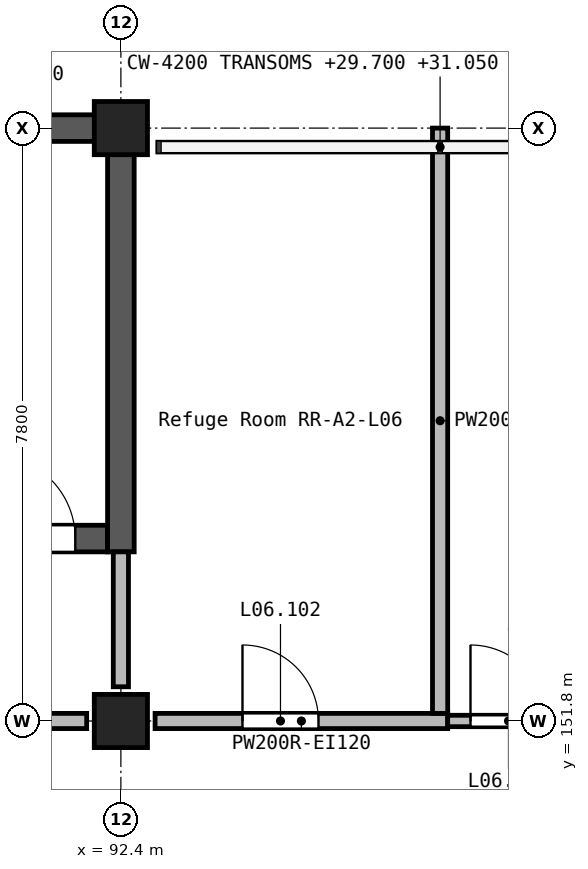
"""IFC4 building model, lengths in metres.
Left out: names, types, materials, properties, quantities, classifications, styles, units other than length and angle.
Written with IfcOpenShell. Run it as: python <this file> out.ifc"""

import sys

from ifc_helpers import new_model, si_unit, direction, frame, frame_2d, origin, origin_2d, place, context, subcontext, project, spatial, rectangle, extrude, element, fill, save


model = new_model("IFC4")
c1 = context("Model", 3, precision=1e-05, world=origin(), true_north=direction((0.0, 1.0)))
c2 = subcontext(c1, "Body", "Model", "MODEL_VIEW")
j1 = project(units=[si_unit("LENGTHUNIT", "METRE"), si_unit("PLANEANGLEUNIT", "RADIAN")], contexts=[c1])
p1 = place(None, origin())
s1 = spatial("IfcSite", under=j1, at=p1, CompositionType="ELEMENT")
p2 = place(p1, origin())
s2 = spatial("IfcBuilding", under=s1, at=p2, CompositionType="ELEMENT")
p3 = place(p2, frame((0.0, 0.0, 28.8)))
s3 = spatial("IfcBuildingStorey", under=s2, at=p3, CompositionType="ELEMENT", Elevation=28.8)
for number, where, z_axis, x_axis in (
    (1, (92.4, 151.8, 0.0), (0.0, 0.0, 1.0), (1.0, 0.0, 0.0)),
    (2, (92.4, 159.6, 0.0), (0.0, 0.0, 1.0), (1.0, 0.0, 0.0)),
):
    element("IfcColumn", number, at=place(p3, frame(where, z_axis=z_axis, x_axis=x_axis)), inside=s3, PredefinedType="COLUMN", context=c2, shape_type="SweptSolid", body=[
        extrude(rectangle(XDim=0.7, YDim=0.7, at=origin_2d()), origin(), (0.0, 0.0, 1.0), 3.9),
    ])
p4 = place(p3, frame((83.825, 159.6, 0.0), z_axis=(0.0, 0.0, 1.0), x_axis=(1.0, 0.0, 0.0)))
e3 = element("IfcWall", 3, at=p4, inside=s3, PredefinedType="SHEAR", context=c2, shape_type="SweptSolid", body=[
    extrude(rectangle(XDim=8.4, YDim=0.35, at=frame_2d((4.2, 0.0))), origin(), (0.0, 0.0, 1.0), 3.9),
])
p5 = place(p3, frame((84.175, 154.2, 0.0), z_axis=(0.0, 0.0, 1.0), x_axis=(1.0, 0.0, 0.0)))
e4 = element("IfcWall", 4, at=p5, inside=s3, PredefinedType="SHEAR", context=c2, shape_type="SweptSolid", body=[
    extrude(rectangle(XDim=8.05, YDim=0.35, at=frame_2d((4.025, 0.0))), origin(), (0.0, 0.0, 1.0), 3.9),
])
p6 = place(p5, frame((6.525, 0.0, 0.0)))
e5 = element("IfcOpeningElement", 5, at=p6, cuts=e4, PredefinedType="OPENING", context=c2, shape_type="SweptSolid", body=[
    extrude(rectangle(XDim=1.1, YDim=2.1, at=frame_2d((0.55, 1.05))), frame((0.0, 0.185, 0.0), z_axis=(0.0, -1.0, 0.0), x_axis=(1.0, 0.0, 0.0)), (0.0, 0.0, 1.0), 0.37),
])
p7 = place(p3, frame((92.4, 154.025, 0.0), z_axis=(0.0, 0.0, 1.0), x_axis=(0.0, 1.0, 0.0)))
e6 = element("IfcWall", 6, at=p7, inside=s3, PredefinedType="SHEAR", context=c2, shape_type="SweptSolid", body=[
    extrude(rectangle(XDim=5.75, YDim=0.35, at=frame_2d((2.875, 0.0))), origin(), (0.0, 0.0, 1.0), 3.9),
])
p8 = place(p3, frame((84.45, 151.8, 0.0), z_axis=(0.0, 0.0, 1.0), x_axis=(1.0, 0.0, 0.0)))
e7 = element("IfcWall", 7, at=p8, inside=s3, PredefinedType="SOLIDWALL", context=c2, shape_type="SweptSolid", body=[
    extrude(rectangle(XDim=7.5, YDim=0.2, at=frame_2d((3.75, 0.0))), origin(), (0.0, 0.0, 1.0), 3.6),
])
p9 = place(p8, frame((3.2, 0.0, 0.0)))
e8 = element("IfcOpeningElement", 8, at=p9, cuts=e7, PredefinedType="OPENING", context=c2, shape_type="SweptSolid", body=[
    extrude(rectangle(XDim=1.1, YDim=2.1, at=frame_2d((0.55, 1.05))), frame((0.0, 0.11, 0.0), z_axis=(0.0, -1.0, 0.0), x_axis=(1.0, 0.0, 0.0)), (0.0, 0.0, 1.0), 0.22),
])
p10 = place(p3, frame((92.85, 151.8, 0.0), z_axis=(0.0, 0.0, 1.0), x_axis=(1.0, 0.0, 0.0)))
e9 = element("IfcWall", 9, at=p10, inside=s3, PredefinedType="SOLIDWALL", context=c2, shape_type="SweptSolid", body=[
    extrude(rectangle(XDim=3.85, YDim=0.2, at=frame_2d((1.925, 0.0))), origin(), (0.0, 0.0, 1.0), 3.6),
])
p11 = place(p10, frame((1.15, 0.0, 0.0)))
e10 = element("IfcOpeningElement", 10, at=p11, cuts=e9, PredefinedType="OPENING", context=c2, shape_type="SweptSolid", body=[
    extrude(rectangle(XDim=1.0, YDim=2.1, at=frame_2d((0.5, 1.05))), frame((0.0, 0.11, 0.0), z_axis=(0.0, -1.0, 0.0), x_axis=(1.0, 0.0, 0.0)), (0.0, 0.0, 1.0), 0.22),
])
p12 = place(p3, frame((92.4, 152.25, 0.0), z_axis=(0.0, 0.0, 1.0), x_axis=(0.0, 1.0, 0.0)))
e11 = element("IfcWall", 11, at=p12, inside=s3, PredefinedType="SOLIDWALL", context=c2, shape_type="SweptSolid", body=[
    extrude(rectangle(XDim=1.775, YDim=0.2, at=frame_2d((0.887, 0.0))), origin(), (0.0, 0.0, 1.0), 3.6),
])
p13 = place(p3, frame((96.6, 151.9, 0.0), z_axis=(0.0, 0.0, 1.0), x_axis=(0.0, 1.0, 0.0)))
e12 = element("IfcWall", 12, at=p13, inside=s3, PredefinedType="SOLIDWALL", context=c2, shape_type="SweptSolid", body=[
    extrude(rectangle(XDim=7.7, YDim=0.2, at=frame_2d((3.85, 0.0))), origin(), (0.0, 0.0, 1.0), 3.6),
])
p14 = place(p3, frame((96.7, 151.8, 0.0), z_axis=(0.0, 0.0, 1.0), x_axis=(1.0, 0.0, 0.0)))
e13 = element("IfcWall", 13, at=p14, inside=s3, PredefinedType="PARTITIONING", context=c2, shape_type="SweptSolid", body=[
    extrude(rectangle(XDim=3.65, YDim=0.15, at=frame_2d((1.825, 0.0))), origin(), (0.0, 0.0, 1.0), 3.6),
])
p15 = place(p14, frame((0.3, 0.0, 0.0)))
e14 = element("IfcOpeningElement", 14, at=p15, cuts=e13, PredefinedType="OPENING", context=c2, shape_type="SweptSolid", body=[
    extrude(rectangle(XDim=1.0, YDim=2.1, at=frame_2d((0.5, 1.05))), frame((0.0, 0.085, 0.0), z_axis=(0.0, -1.0, 0.0), x_axis=(1.0, 0.0, 0.0)), (0.0, 0.0, 1.0), 0.17),
])
p16 = place(p15, origin())
e15 = element("IfcDoor", 15, at=p16, inside=s3, OperationType="SINGLE_SWING_LEFT", PredefinedType="DOOR", context=c2, shape_type="SweptSolid", body=[
    extrude(rectangle(XDim=1.0, YDim=2.1, at=frame_2d((0.5, 1.05))), frame((0.0, 0.025, 0.0), z_axis=(0.0, -1.0, 0.0), x_axis=(1.0, 0.0, 0.0)), (0.0, 0.0, 1.0), 0.05),
])
fill(e14, e15)
p17 = place(p11, origin())
e16 = element("IfcDoor", 16, at=p17, inside=s3, OperationType="SINGLE_SWING_LEFT", PredefinedType="DOOR", context=c2, shape_type="SweptSolid", body=[
    extrude(rectangle(XDim=1.0, YDim=2.1, at=frame_2d((0.5, 1.05))), frame((0.0, 0.025, 0.0), z_axis=(0.0, -1.0, 0.0), x_axis=(1.0, 0.0, 0.0)), (0.0, 0.0, 1.0), 0.05),
])
fill(e10, e16)
p18 = place(p6, origin())
e17 = element("IfcDoor", 17, at=p18, inside=s3, OperationType="SINGLE_SWING_RIGHT", PredefinedType="DOOR", context=c2, shape_type="SweptSolid", body=[
    extrude(rectangle(XDim=1.1, YDim=2.1, at=frame_2d((0.55, 1.05))), frame((0.0, 0.025, 0.0), z_axis=(0.0, -1.0, 0.0), x_axis=(1.0, 0.0, 0.0)), (0.0, 0.0, 1.0), 0.05),
])
fill(e5, e17)
save(model, sys.argv[1])
